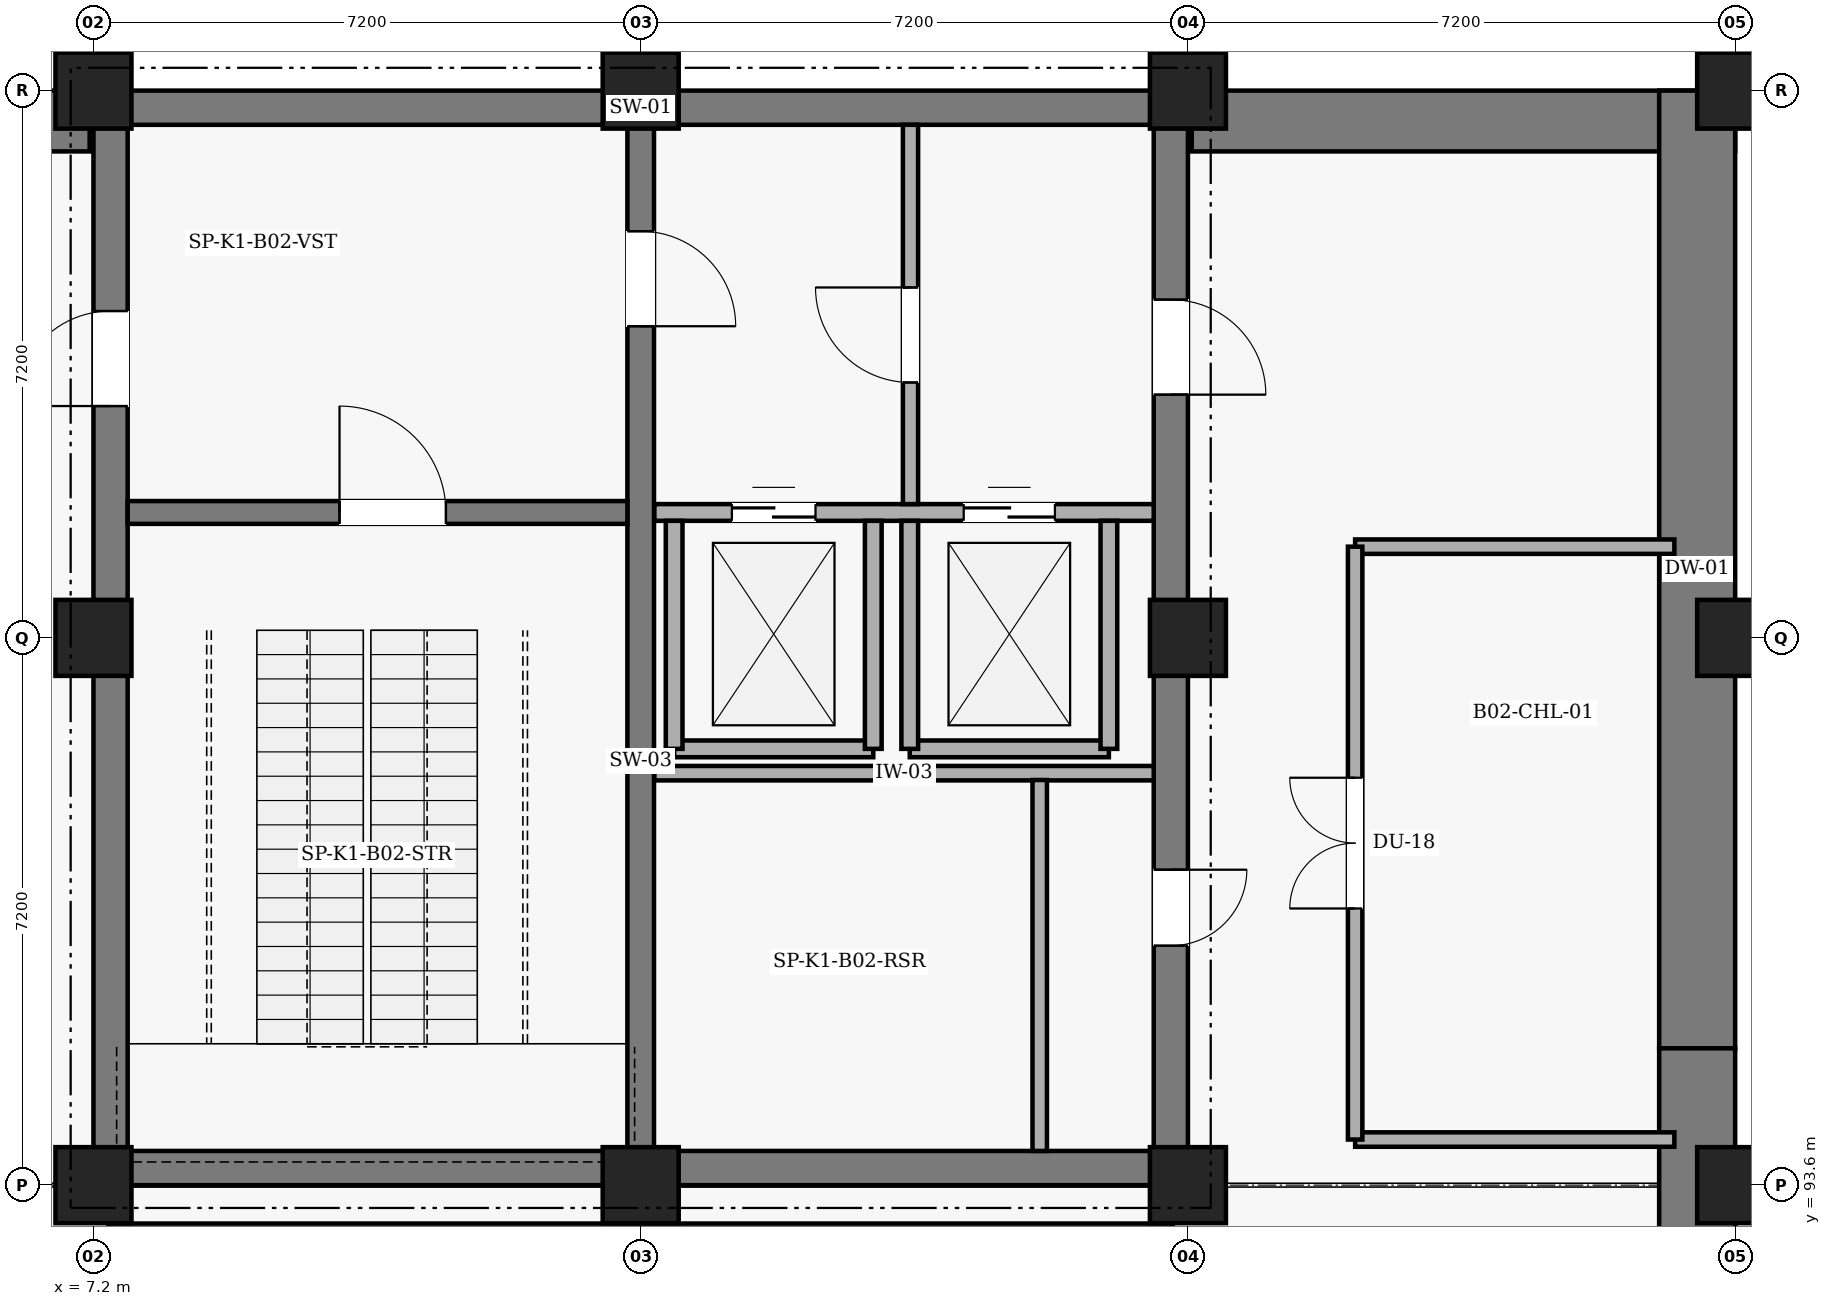
"""IFC4 building model, lengths in metres.
Left out: names, types, materials, properties, quantities, classifications, styles, units other than length and angle.
Written with IfcOpenShell. Run it as: python <this file> out.ifc"""

import sys

from ifc_helpers import new_model, si_unit, direction, frame, frame_2d, origin, origin_2d, place, context, subcontext, project, spatial, rectangle, extrude, element, fill, save


model = new_model("IFC4")
c1 = context("Model", 3, precision=1e-05, world=origin(), true_north=direction((0.0, 1.0)))
c2 = subcontext(c1, "Body", "Model", "MODEL_VIEW")
j1 = project(units=[si_unit("LENGTHUNIT", "METRE"), si_unit("PLANEANGLEUNIT", "RADIAN")], contexts=[c1])
p1 = place(None, origin())
s1 = spatial("IfcSite", under=j1, at=p1, CompositionType="ELEMENT")
p2 = place(p1, origin())
s2 = spatial("IfcBuilding", under=s1, at=p2, CompositionType="ELEMENT")
p3 = place(p2, frame((0.0, 0.0, -10.8)))
s3 = spatial("IfcBuildingStorey", under=s2, at=p3, CompositionType="ELEMENT", Elevation=-10.8)
p4 = place(p3, frame((0.0, 107.6, 0.0), z_axis=(0.0, 0.0, 1.0), x_axis=(1.0, 0.0, 0.0)))
e1 = element("IfcWall", 1, at=p4, inside=s3, PredefinedType="USERDEFINED", context=c2, shape_type="SweptSolid", body=[
    extrude(rectangle(XDim=7.15, YDim=0.8, at=frame_2d((3.575, 0.0))), origin(), (0.0, 0.0, 1.0), 5.0),
])
p5 = place(p3, frame((21.65, 107.6, 0.0), z_axis=(0.0, 0.0, 1.0), x_axis=(1.0, 0.0, 0.0)))
e2 = element("IfcWall", 2, at=p5, inside=s3, PredefinedType="USERDEFINED", context=c2, shape_type="SweptSolid", body=[
    extrude(rectangle(XDim=7.15, YDim=0.8, at=frame_2d((3.575, 0.0))), origin(), (0.0, 0.0, 1.0), 5.0),
])
p6 = place(p3, frame((28.3, 108.0, 0.0), z_axis=(0.0, 0.0, 1.0), x_axis=(0.0, -1.0, 0.0)))
e3 = element("IfcWall", 3, at=p6, inside=s3, PredefinedType="USERDEFINED", context=c2, shape_type="SweptSolid", body=[
    extrude(rectangle(XDim=12.6, YDim=1.0, at=frame_2d((6.3, 0.0))), origin(), (0.0, 0.0, 1.0), 5.0),
])
p7 = place(p3, frame((28.3, 95.4, 0.0), z_axis=(0.0, 0.0, 1.0), x_axis=(0.0, -1.0, 0.0)))
e4 = element("IfcWall", 4, at=p7, inside=s3, PredefinedType="USERDEFINED", context=c2, shape_type="SweptSolid", body=[
    extrude(rectangle(XDim=12.6, YDim=1.0, at=frame_2d((6.3, 0.0))), origin(), (0.0, 0.0, 1.0), 5.0),
])
p8 = place(p3, frame((7.2, 107.775, 0.0), z_axis=(0.0, 0.0, 1.0), x_axis=(1.0, 0.0, 0.0)))
e5 = element("IfcWall", 5, at=p8, inside=s3, PredefinedType="SHEAR", context=c2, shape_type="SweptSolid", body=[
    extrude(rectangle(XDim=14.4, YDim=0.45, at=frame_2d((7.2, 0.0))), origin(), (0.0, 0.0, 1.0), 5.4),
])
p9 = place(p3, frame((21.375, 107.55, 0.0), z_axis=(0.0, 0.0, 1.0), x_axis=(0.0, -1.0, 0.0)))
e6 = element("IfcWall", 6, at=p9, inside=s3, PredefinedType="SHEAR", context=c2, shape_type="SweptSolid", body=[
    extrude(rectangle(XDim=13.5, YDim=0.45, at=frame_2d((6.75, 0.0))), origin(), (0.0, 0.0, 1.0), 5.4),
])
p10 = place(p9, frame((9.8, 0.0, 0.0)))
e7 = element("IfcOpeningElement", 7, at=p10, cuts=e6, PredefinedType="OPENING", context=c2, shape_type="SweptSolid", body=[
    extrude(rectangle(XDim=1.0, YDim=2.15, at=frame_2d((0.5, 1.075))), frame((0.0, 0.235, 0.0), z_axis=(0.0, -1.0, 0.0), x_axis=(1.0, 0.0, 0.0)), (0.0, 0.0, 1.0), 0.47),
])
p11 = place(p9, frame((2.3, 0.0, 0.0)))
e8 = element("IfcOpeningElement", 8, at=p11, cuts=e6, PredefinedType="OPENING", context=c2, shape_type="SweptSolid", body=[
    extrude(rectangle(XDim=1.25, YDim=2.2, at=frame_2d((0.625, 1.1))), frame((0.0, 0.235, 0.0), z_axis=(0.0, -1.0, 0.0), x_axis=(1.0, 0.0, 0.0)), (0.0, 0.0, 1.0), 0.47),
])
p12 = place(p3, frame((21.6, 93.825, 0.0), z_axis=(0.0, 0.0, 1.0), x_axis=(-1.0, 0.0, 0.0)))
e9 = element("IfcWall", 9, at=p12, inside=s3, PredefinedType="SHEAR", context=c2, shape_type="SweptSolid", body=[
    extrude(rectangle(XDim=14.4, YDim=0.45, at=frame_2d((7.2, 0.0))), origin(), (0.0, 0.0, 1.0), 5.4),
])
p13 = place(p3, frame((7.425, 94.05, 0.0), z_axis=(0.0, 0.0, 1.0), x_axis=(0.0, 1.0, 0.0)))
e10 = element("IfcWall", 10, at=p13, inside=s3, PredefinedType="SHEAR", context=c2, shape_type="SweptSolid", body=[
    extrude(rectangle(XDim=13.5, YDim=0.45, at=frame_2d((6.75, 0.0))), origin(), (0.0, 0.0, 1.0), 5.4),
])
p14 = place(p13, frame((9.8, 0.0, 0.0)))
e11 = element("IfcOpeningElement", 11, at=p14, cuts=e10, PredefinedType="OPENING", context=c2, shape_type="SweptSolid", body=[
    extrude(rectangle(XDim=1.25, YDim=2.2, at=frame_2d((0.625, 1.1))), frame((0.0, 0.235, 0.0), z_axis=(0.0, -1.0, 0.0), x_axis=(1.0, 0.0, 0.0)), (0.0, 0.0, 1.0), 0.47),
])
p15 = place(p3, frame((14.4, 107.55, 0.0), z_axis=(0.0, 0.0, 1.0), x_axis=(0.0, -1.0, 0.0)))
e12 = element("IfcWall", 12, at=p15, inside=s3, PredefinedType="SHEAR", context=c2, shape_type="SweptSolid", body=[
    extrude(rectangle(XDim=13.5, YDim=0.35, at=frame_2d((6.75, 0.0))), origin(), (0.0, 0.0, 1.0), 5.4),
])
p16 = place(p15, frame((1.4, 0.0, 0.0)))
e13 = element("IfcOpeningElement", 13, at=p16, cuts=e12, PredefinedType="OPENING", context=c2, shape_type="SweptSolid", body=[
    extrude(rectangle(XDim=1.25, YDim=2.2, at=frame_2d((0.625, 1.1))), frame((0.0, 0.185, 0.0), z_axis=(0.0, -1.0, 0.0), x_axis=(1.0, 0.0, 0.0)), (0.0, 0.0, 1.0), 0.37),
])
p17 = place(p3, frame((7.65, 102.45, 0.0), z_axis=(0.0, 0.0, 1.0), x_axis=(1.0, 0.0, 0.0)))
e14 = element("IfcWall", 14, at=p17, inside=s3, PredefinedType="SHEAR", context=c2, shape_type="SweptSolid", body=[
    extrude(rectangle(XDim=6.575, YDim=0.3, at=frame_2d((3.288, 0.0))), origin(), (0.0, 0.0, 1.0), 5.4),
])
p18 = place(p17, frame((2.788, 0.0, 0.0)))
e15 = element("IfcOpeningElement", 15, at=p18, cuts=e14, PredefinedType="OPENING", context=c2, shape_type="SweptSolid", body=[
    extrude(rectangle(XDim=1.4, YDim=2.2, at=frame_2d((0.7, 1.1))), frame((0.0, 0.16, 0.0), z_axis=(0.0, -1.0, 0.0), x_axis=(1.0, 0.0, 0.0)), (0.0, 0.0, 1.0), 0.32),
])
for number, where, z_axis, x_axis in (
    (16, (7.2, 93.6, 0.0), (0.0, 0.0, 1.0), (1.0, 0.0, 0.0)),
    (17, (7.2, 100.8, 0.0), (0.0, 0.0, 1.0), (1.0, 0.0, 0.0)),
    (18, (7.2, 108.0, 0.0), (0.0, 0.0, 1.0), (1.0, 0.0, 0.0)),
    (19, (14.4, 93.6, 0.0), (0.0, 0.0, 1.0), (1.0, 0.0, 0.0)),
    (20, (14.4, 108.0, 0.0), (0.0, 0.0, 1.0), (1.0, 0.0, 0.0)),
    (21, (21.6, 93.6, 0.0), (0.0, 0.0, 1.0), (1.0, 0.0, 0.0)),
    (22, (21.6, 100.8, 0.0), (0.0, 0.0, 1.0), (1.0, 0.0, 0.0)),
    (23, (21.6, 108.0, 0.0), (0.0, 0.0, 1.0), (1.0, 0.0, 0.0)),
    (24, (28.8, 93.6, 0.0), (0.0, 0.0, 1.0), (1.0, 0.0, 0.0)),
    (25, (28.8, 100.8, 0.0), (0.0, 0.0, 1.0), (1.0, 0.0, 0.0)),
    (26, (28.8, 108.0, 0.0), (0.0, 0.0, 1.0), (1.0, 0.0, 0.0)),
):
    element("IfcColumn", number, at=place(p3, frame(where, z_axis=z_axis, x_axis=x_axis)), inside=s3, PredefinedType="COLUMN", context=c2, shape_type="SweptSolid", body=[
        extrude(rectangle(XDim=1.0, YDim=1.0, at=origin_2d()), origin(), (0.0, 0.0, 1.0), 5.0),
    ])
p19 = place(p3, frame((14.58, 99.02, 0.0), z_axis=(0.0, 0.0, 1.0), x_axis=(1.0, 0.0, 0.0)))
e27 = element("IfcWall", 27, at=p19, inside=s3, PredefinedType="PARTITIONING", context=c2, shape_type="SweptSolid", body=[
    extrude(rectangle(XDim=6.57, YDim=0.19, at=frame_2d((3.285, 0.0))), origin(), (0.0, 0.0, 1.0), 5.05),
])
p20 = place(p3, frame((19.65, 94.05, 0.0), z_axis=(0.0, 0.0, 1.0), x_axis=(0.0, 1.0, 0.0)))
e28 = element("IfcWall", 28, at=p20, inside=s3, PredefinedType="PARTITIONING", context=c2, shape_type="SweptSolid", body=[
    extrude(rectangle(XDim=4.88, YDim=0.19, at=frame_2d((2.44, 0.0))), origin(), (0.0, 0.0, 1.0), 5.05),
])
p21 = place(p3, frame((14.58, 102.45, 0.0), z_axis=(0.0, 0.0, 1.0), x_axis=(1.0, 0.0, 0.0)))
e29 = element("IfcWall", 29, at=p21, inside=s3, PredefinedType="PARTITIONING", context=c2, shape_type="SweptSolid", body=[
    extrude(rectangle(XDim=6.57, YDim=0.22, at=frame_2d((3.285, 0.0))), origin(), (0.0, 0.0, 1.0), 5.05),
])
p22 = place(p21, frame((1.02, 0.0, 0.0)))
e30 = element("IfcOpeningElement", 30, at=p22, cuts=e29, PredefinedType="OPENING", context=c2, shape_type="SweptSolid", body=[
    extrude(rectangle(XDim=1.1, YDim=2.15, at=frame_2d((0.55, 1.075))), frame((0.0, 0.12, 0.0), z_axis=(0.0, -1.0, 0.0), x_axis=(1.0, 0.0, 0.0)), (0.0, 0.0, 1.0), 0.24),
])
p23 = place(p21, frame((4.07, 0.0, 0.0)))
e31 = element("IfcOpeningElement", 31, at=p23, cuts=e29, PredefinedType="OPENING", context=c2, shape_type="SweptSolid", body=[
    extrude(rectangle(XDim=1.2, YDim=2.15, at=frame_2d((0.6, 1.075))), frame((0.0, 0.12, 0.0), z_axis=(0.0, -1.0, 0.0), x_axis=(1.0, 0.0, 0.0)), (0.0, 0.0, 1.0), 0.24),
])
p24 = place(p3, frame((14.84, 99.34, 0.0), z_axis=(0.0, 0.0, 1.0), x_axis=(1.0, 0.0, 0.0)))
e32 = element("IfcWall", 32, at=p24, inside=s3, PredefinedType="PARTITIONING", context=c2, shape_type="SweptSolid", body=[
    extrude(rectangle(XDim=2.62, YDim=0.22, at=frame_2d((1.31, 0.0))), origin(), (0.0, 0.0, 1.0), 5.05),
])
for number, where, z_axis, x_axis in (
    (33, (14.84, 99.34, 0.0), (0.0, 0.0, 1.0), (0.0, 1.0, 0.0)),
    (34, (17.46, 99.34, 0.0), (0.0, 0.0, 1.0), (0.0, 1.0, 0.0)),
):
    element("IfcWall", number, at=place(p3, frame(where, z_axis=z_axis, x_axis=x_axis)), inside=s3, PredefinedType="PARTITIONING", context=c2, shape_type="SweptSolid", body=[
        extrude(rectangle(XDim=3.0, YDim=0.22, at=frame_2d((1.5, 0.0))), origin(), (0.0, 0.0, 1.0), 5.05),
    ])
p25 = place(p3, frame((17.94, 99.34, 0.0), z_axis=(0.0, 0.0, 1.0), x_axis=(1.0, 0.0, 0.0)))
e35 = element("IfcWall", 35, at=p25, inside=s3, PredefinedType="PARTITIONING", context=c2, shape_type="SweptSolid", body=[
    extrude(rectangle(XDim=2.62, YDim=0.22, at=frame_2d((1.31, 0.0))), origin(), (0.0, 0.0, 1.0), 5.05),
])
for number, where, z_axis, x_axis in (
    (36, (17.94, 99.34, 0.0), (0.0, 0.0, 1.0), (0.0, 1.0, 0.0)),
    (37, (20.56, 99.34, 0.0), (0.0, 0.0, 1.0), (0.0, 1.0, 0.0)),
):
    element("IfcWall", number, at=place(p3, frame(where, z_axis=z_axis, x_axis=x_axis)), inside=s3, PredefinedType="PARTITIONING", context=c2, shape_type="SweptSolid", body=[
        extrude(rectangle(XDim=3.0, YDim=0.22, at=frame_2d((1.5, 0.0))), origin(), (0.0, 0.0, 1.0), 5.05),
    ])
p26 = place(p3, frame((17.95, 102.56, 0.0), z_axis=(0.0, 0.0, 1.0), x_axis=(0.0, 1.0, 0.0)))
e38 = element("IfcWall", 38, at=p26, inside=s3, PredefinedType="PARTITIONING", context=c2, shape_type="SweptSolid", body=[
    extrude(rectangle(XDim=4.99, YDim=0.2, at=frame_2d((2.495, 0.0))), origin(), (0.0, 0.0, 1.0), 5.05),
])
p27 = place(p26, frame((1.6, 0.0, 0.0)))
e39 = element("IfcOpeningElement", 39, at=p27, cuts=e38, PredefinedType="OPENING", context=c2, shape_type="SweptSolid", body=[
    extrude(rectangle(XDim=1.25, YDim=2.2, at=frame_2d((0.625, 1.1))), frame((0.0, 0.11, 0.0), z_axis=(0.0, -1.0, 0.0), x_axis=(1.0, 0.0, 0.0)), (0.0, 0.0, 1.0), 0.22),
])
p28 = place(p3, frame((7.4, 93.0, 0.0), z_axis=(0.0, 0.0, 1.0), x_axis=(1.0, 0.0, 0.0)))
e40 = element("IfcWall", 40, at=p28, inside=s3, PredefinedType="PARTITIONING", context=c2, shape_type="SweptSolid", body=[
    extrude(rectangle(XDim=14.0, YDim=0.19, at=frame_2d((7.0, 0.0))), origin(), (0.0, 0.0, 1.0), 4.22),
])
for number, where, z_axis, x_axis in (
    (41, (23.8, 102.0, 0.0), (0.0, 0.0, 1.0), (1.0, 0.0, 0.0)),
    (42, (28.0, 94.2, 0.0), (0.0, 0.0, 1.0), (-1.0, 0.0, 0.0)),
):
    element("IfcWall", number, at=place(p3, frame(where, z_axis=z_axis, x_axis=x_axis)), inside=s3, PredefinedType="PARTITIONING", context=c2, shape_type="SweptSolid", body=[
        extrude(rectangle(XDim=4.2, YDim=0.19, at=frame_2d((2.1, 0.0))), origin(), (0.0, 0.0, 1.0), 5.05),
    ])
p29 = place(p3, frame((23.8, 94.2, 0.0), z_axis=(0.0, 0.0, 1.0), x_axis=(0.0, 1.0, 0.0)))
e43 = element("IfcWall", 43, at=p29, inside=s3, PredefinedType="PARTITIONING", context=c2, shape_type="SweptSolid", body=[
    extrude(rectangle(XDim=7.8, YDim=0.19, at=frame_2d((3.9, 0.0))), origin(), (0.0, 0.0, 1.0), 4.12),
])
p30 = place(p29, frame((3.04, 0.0, 0.0)))
e44 = element("IfcOpeningElement", 44, at=p30, cuts=e43, PredefinedType="OPENING", context=c2, shape_type="SweptSolid", body=[
    extrude(rectangle(XDim=1.72, YDim=2.22, at=frame_2d((0.86, 1.11))), frame((0.0, 0.105, 0.0), z_axis=(0.0, -1.0, 0.0), x_axis=(1.0, 0.0, 0.0)), (0.0, 0.0, 1.0), 0.21),
])
p31 = place(p18, origin())
e45 = element("IfcDoor", 45, at=p31, inside=s3, OperationType="SINGLE_SWING_LEFT", PredefinedType="DOOR", context=c2, shape_type="SweptSolid", body=[
    extrude(rectangle(XDim=1.4, YDim=2.2, at=frame_2d((0.7, 1.1))), frame((0.0, 0.025, 0.0), z_axis=(0.0, -1.0, 0.0), x_axis=(1.0, 0.0, 0.0)), (0.0, 0.0, 1.0), 0.05),
])
fill(e15, e45)
p32 = place(p16, origin())
e46 = element("IfcDoor", 46, at=p32, inside=s3, OperationType="SINGLE_SWING_RIGHT", PredefinedType="DOOR", context=c2, shape_type="SweptSolid", body=[
    extrude(rectangle(XDim=1.25, YDim=2.2, at=frame_2d((0.625, 1.1))), frame((0.0, 0.025, 0.0), z_axis=(0.0, -1.0, 0.0), x_axis=(1.0, 0.0, 0.0)), (0.0, 0.0, 1.0), 0.05),
])
fill(e13, e46)
p33 = place(p10, origin())
e47 = element("IfcDoor", 47, at=p33, inside=s3, OperationType="SINGLE_SWING_LEFT", PredefinedType="DOOR", context=c2, shape_type="SweptSolid", body=[
    extrude(rectangle(XDim=1.0, YDim=2.15, at=frame_2d((0.5, 1.075))), frame((0.0, 0.025, 0.0), z_axis=(0.0, -1.0, 0.0), x_axis=(1.0, 0.0, 0.0)), (0.0, 0.0, 1.0), 0.05),
])
fill(e7, e47)
p34 = place(p22, origin())
e48 = element("IfcDoor", 48, at=p34, inside=s3, OperationType="DOUBLE_DOOR_SLIDING", PredefinedType="DOOR", context=c2, shape_type="SweptSolid", body=[
    extrude(rectangle(XDim=1.1, YDim=2.15, at=frame_2d((0.55, 1.075))), frame((0.0, 0.025, 0.0), z_axis=(0.0, -1.0, 0.0), x_axis=(1.0, 0.0, 0.0)), (0.0, 0.0, 1.0), 0.05),
])
fill(e30, e48)
p35 = place(p23, origin())
e49 = element("IfcDoor", 49, at=p35, inside=s3, OperationType="DOUBLE_DOOR_SLIDING", PredefinedType="DOOR", context=c2, shape_type="SweptSolid", body=[
    extrude(rectangle(XDim=1.2, YDim=2.15, at=frame_2d((0.6, 1.075))), frame((0.0, 0.025, 0.0), z_axis=(0.0, -1.0, 0.0), x_axis=(1.0, 0.0, 0.0)), (0.0, 0.0, 1.0), 0.05),
])
fill(e31, e49)
p36 = place(p27, origin())
e50 = element("IfcDoor", 50, at=p36, inside=s3, OperationType="SINGLE_SWING_RIGHT", PredefinedType="DOOR", context=c2, shape_type="SweptSolid", body=[
    extrude(rectangle(XDim=1.25, YDim=2.2, at=frame_2d((0.625, 1.1))), frame((0.0, 0.025, 0.0), z_axis=(0.0, -1.0, 0.0), x_axis=(1.0, 0.0, 0.0)), (0.0, 0.0, 1.0), 0.05),
])
fill(e39, e50)
p37 = place(p14, origin())
e51 = element("IfcDoor", 51, at=p37, inside=s3, OperationType="SINGLE_SWING_LEFT", PredefinedType="DOOR", context=c2, shape_type="SweptSolid", body=[
    extrude(rectangle(XDim=1.25, YDim=2.2, at=frame_2d((0.625, 1.1))), frame((0.0, 0.025, 0.0), z_axis=(0.0, -1.0, 0.0), x_axis=(1.0, 0.0, 0.0)), (0.0, 0.0, 1.0), 0.05),
])
fill(e11, e51)
p38 = place(p11, origin())
e52 = element("IfcDoor", 52, at=p38, inside=s3, OperationType="SINGLE_SWING_RIGHT", PredefinedType="DOOR", context=c2, shape_type="SweptSolid", body=[
    extrude(rectangle(XDim=1.25, YDim=2.2, at=frame_2d((0.625, 1.1))), frame((0.0, 0.025, 0.0), z_axis=(0.0, -1.0, 0.0), x_axis=(1.0, 0.0, 0.0)), (0.0, 0.0, 1.0), 0.05),
])
fill(e8, e52)
p39 = place(p30, origin())
e53 = element("IfcDoor", 53, at=p39, inside=s3, OperationType="DOUBLE_DOOR_SINGLE_SWING", PredefinedType="DOOR", context=c2, shape_type="SweptSolid", body=[
    extrude(rectangle(XDim=1.72, YDim=2.22, at=frame_2d((0.86, 1.11))), frame((0.0, 0.025, 0.0), z_axis=(0.0, -1.0, 0.0), x_axis=(1.0, 0.0, 0.0)), (0.0, 0.0, 1.0), 0.05),
])
fill(e44, e53)
save(model, sys.argv[1])
